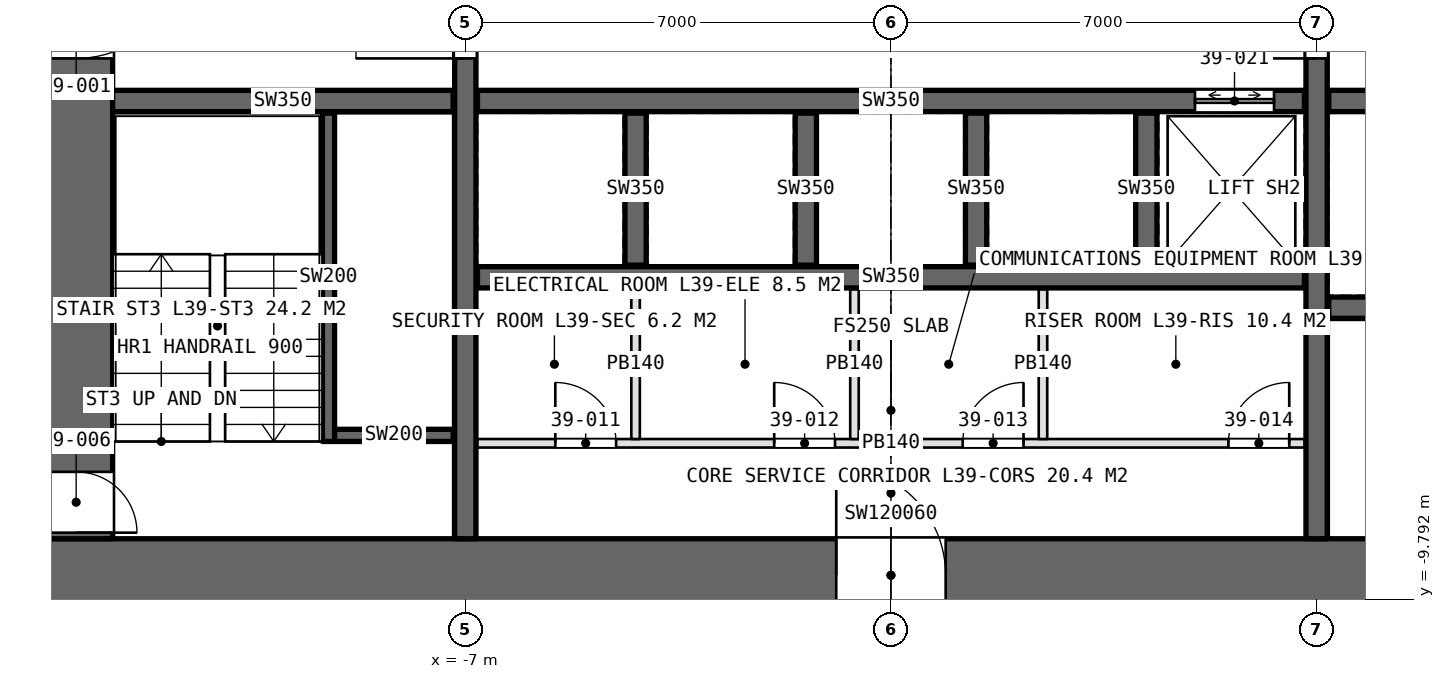
"""IFC4 building model, lengths in metres.
Left out: names, types, materials, properties, quantities, classifications, styles, units other than length and angle.
Written with IfcOpenShell. Run it as: python <this file> out.ifc"""

import sys

from ifc_helpers import new_model, si_unit, direction, frame, frame_2d, origin, place, context, subcontext, project, spatial, rectangle, extrude, element, fill, save


model = new_model("IFC4")
c1 = context("Model", 3, precision=1e-05, world=origin(), true_north=direction((0.0, 1.0)))
c2 = subcontext(c1, "Body", "Model", "MODEL_VIEW")
j1 = project(units=[si_unit("LENGTHUNIT", "METRE"), si_unit("PLANEANGLEUNIT", "RADIAN")], contexts=[c1])
p1 = place(None, origin())
s1 = spatial("IfcSite", under=j1, at=p1, CompositionType="ELEMENT")
p2 = place(p1, origin())
s2 = spatial("IfcBuilding", under=s1, at=p2, CompositionType="ELEMENT")
p3 = place(p2, frame((0.0, 0.0, 180.6)))
s3 = spatial("IfcBuildingStorey", under=s2, at=p3, CompositionType="ELEMENT", Elevation=180.6)
p4 = place(p3, frame((-14.0, -9.4, 0.0), z_axis=(0.0, 0.0, 1.0), x_axis=(1.0, 0.0, 0.0)))
e1 = element("IfcWall", 1, at=p4, inside=s3, PredefinedType="SHEAR", context=c2, shape_type="SweptSolid", body=[
    extrude(rectangle(XDim=28.0, YDim=1.2, at=frame_2d((14.0, 0.0))), origin(), (0.0, 0.0, 1.0), 4.2),
])
p5 = place(p4, frame((13.1, 0.0, 0.0)))
e2 = element("IfcOpeningElement", 2, at=p5, cuts=e1, PredefinedType="OPENING", context=c2, shape_type="SweptSolid", body=[
    extrude(rectangle(XDim=1.8, YDim=2.4, at=frame_2d((0.9, 1.2))), frame((0.0, 0.61, 0.0), z_axis=(0.0, -1.0, 0.0), x_axis=(1.0, 0.0, 0.0)), (0.0, 0.0, 1.0), 1.22),
])
p6 = place(p4, frame((22.9, 0.0, 0.0)))
e3 = element("IfcOpeningElement", 3, at=p6, cuts=e1, PredefinedType="OPENING", context=c2, shape_type="SweptSolid", body=[
    extrude(rectangle(XDim=2.2, YDim=2.7, at=frame_2d((1.1, 1.35))), frame((0.0, 0.61, 0.0), z_axis=(0.0, -1.0, 0.0), x_axis=(1.0, 0.0, 0.0)), (0.0, 0.0, 1.0), 1.22),
])
p7 = place(p3, frame((-13.4, 8.8, 0.0), z_axis=(0.0, 0.0, 1.0), x_axis=(0.0, -1.0, 0.0)))
e4 = element("IfcWall", 4, at=p7, inside=s3, PredefinedType="SHEAR", context=c2, shape_type="SweptSolid", body=[
    extrude(rectangle(XDim=17.6, YDim=1.2, at=frame_2d((8.8, 0.0))), origin(), (0.0, 0.0, 1.0), 4.2),
])
p8 = place(p7, frame((7.9, 0.0, 0.0)))
e5 = element("IfcOpeningElement", 5, at=p8, cuts=e4, PredefinedType="OPENING", context=c2, shape_type="SweptSolid", body=[
    extrude(rectangle(XDim=1.8, YDim=2.4, at=frame_2d((0.9, 1.2))), frame((0.0, 0.61, 0.0), z_axis=(0.0, -1.0, 0.0), x_axis=(1.0, 0.0, 0.0)), (0.0, 0.0, 1.0), 1.22),
])
p9 = place(p7, frame((16.5, 0.0, 0.0)))
e6 = element("IfcOpeningElement", 6, at=p9, cuts=e4, PredefinedType="OPENING", context=c2, shape_type="SweptSolid", body=[
    extrude(rectangle(XDim=1.0, YDim=2.4, at=frame_2d((0.5, 1.2))), frame((0.0, 0.61, 0.0), z_axis=(0.0, -1.0, 0.0), x_axis=(1.0, 0.0, 0.0)), (0.0, 0.0, 1.0), 1.22),
])
p10 = place(p3, frame((-7.0, -8.8, 0.0), z_axis=(0.0, 0.0, 1.0), x_axis=(0.0, 1.0, 0.0)))
e7 = element("IfcWall", 7, at=p10, inside=s3, PredefinedType="SHEAR", context=c2, shape_type="SweptSolid", body=[
    extrude(rectangle(XDim=17.6, YDim=0.35, at=frame_2d((8.8, 0.0))), origin(), (0.0, 0.0, 1.0), 4.2),
])
p11 = place(p10, frame((7.9, 0.0, 0.0)))
e8 = element("IfcOpeningElement", 8, at=p11, cuts=e7, PredefinedType="OPENING", context=c2, shape_type="SweptSolid", body=[
    extrude(rectangle(XDim=1.8, YDim=2.4, at=frame_2d((0.9, 1.2))), frame((0.0, 0.185, 0.0), z_axis=(0.0, -1.0, 0.0), x_axis=(1.0, 0.0, 0.0)), (0.0, 0.0, 1.0), 0.37),
])
p12 = place(p3, frame((7.0, -8.8, 0.0), z_axis=(0.0, 0.0, 1.0), x_axis=(0.0, 1.0, 0.0)))
e9 = element("IfcWall", 9, at=p12, inside=s3, PredefinedType="SHEAR", context=c2, shape_type="SweptSolid", body=[
    extrude(rectangle(XDim=17.6, YDim=0.35, at=frame_2d((8.8, 0.0))), origin(), (0.0, 0.0, 1.0), 4.2),
])
p13 = place(p12, frame((7.9, 0.0, 0.0)))
e10 = element("IfcOpeningElement", 10, at=p13, cuts=e9, PredefinedType="OPENING", context=c2, shape_type="SweptSolid", body=[
    extrude(rectangle(XDim=1.8, YDim=2.4, at=frame_2d((0.9, 1.2))), frame((0.0, 0.185, 0.0), z_axis=(0.0, -1.0, 0.0), x_axis=(1.0, 0.0, 0.0)), (0.0, 0.0, 1.0), 0.37),
])
p14 = place(p3, frame((-6.8, -1.6, 0.0), z_axis=(0.0, 0.0, 1.0), x_axis=(1.0, 0.0, 0.0)))
e11 = element("IfcWall", 11, at=p14, inside=s3, PredefinedType="SHEAR", context=c2, shape_type="SweptSolid", body=[
    extrude(rectangle(XDim=13.6, YDim=0.35, at=frame_2d((6.8, 0.0))), origin(), (0.0, 0.0, 1.0), 4.2),
])
p15 = place(p14, frame((11.8, 0.0, 0.0)))
e12 = element("IfcOpeningElement", 12, at=p15, cuts=e11, PredefinedType="OPENING", context=c2, shape_type="SweptSolid", body=[
    extrude(rectangle(XDim=1.3, YDim=2.4, at=frame_2d((0.65, 1.2))), frame((0.0, 0.185, 0.0), z_axis=(0.0, -1.0, 0.0), x_axis=(1.0, 0.0, 0.0)), (0.0, 0.0, 1.0), 0.37),
])
p16 = place(p3, frame((-6.8, -4.5, 0.0), z_axis=(0.0, 0.0, 1.0), x_axis=(1.0, 0.0, 0.0)))
e13 = element("IfcWall", 13, at=p16, inside=s3, PredefinedType="SHEAR", context=c2, shape_type="SweptSolid", body=[
    extrude(rectangle(XDim=13.6, YDim=0.35, at=frame_2d((6.8, 0.0))), origin(), (0.0, 0.0, 1.0), 4.2),
])
p17 = place(p3, frame((-12.8, -1.6, 0.0), z_axis=(0.0, 0.0, 1.0), x_axis=(1.0, 0.0, 0.0)))
e14 = element("IfcWall", 14, at=p17, inside=s3, PredefinedType="SHEAR", context=c2, shape_type="SweptSolid", body=[
    extrude(rectangle(XDim=5.6, YDim=0.35, at=frame_2d((2.8, 0.0))), origin(), (0.0, 0.0, 1.0), 4.2),
])
p18 = place(p3, frame((7.2, -1.6, 0.0), z_axis=(0.0, 0.0, 1.0), x_axis=(1.0, 0.0, 0.0)))
e15 = element("IfcWall", 15, at=p18, inside=s3, PredefinedType="SHEAR", context=c2, shape_type="SweptSolid", body=[
    extrude(rectangle(XDim=5.6, YDim=0.35, at=frame_2d((2.8, 0.0))), origin(), (0.0, 0.0, 1.0), 4.2),
])
p19 = place(p18, frame((0.9, 0.0, 0.0)))
e16 = element("IfcOpeningElement", 16, at=p19, cuts=e15, PredefinedType="OPENING", context=c2, shape_type="SweptSolid", body=[
    extrude(rectangle(XDim=1.3, YDim=2.4, at=frame_2d((0.65, 1.2))), frame((0.0, 0.185, 0.0), z_axis=(0.0, -1.0, 0.0), x_axis=(1.0, 0.0, 0.0)), (0.0, 0.0, 1.0), 0.37),
])
p20 = place(p18, frame((3.9, 0.0, 0.0)))
e17 = element("IfcOpeningElement", 17, at=p20, cuts=e15, PredefinedType="OPENING", context=c2, shape_type="SweptSolid", body=[
    extrude(rectangle(XDim=1.3, YDim=2.4, at=frame_2d((0.65, 1.2))), frame((0.0, 0.185, 0.0), z_axis=(0.0, -1.0, 0.0), x_axis=(1.0, 0.0, 0.0)), (0.0, 0.0, 1.0), 0.37),
])
p21 = place(p3, frame((7.2, -5.0, 0.0), z_axis=(0.0, 0.0, 1.0), x_axis=(1.0, 0.0, 0.0)))
e18 = element("IfcWall", 18, at=p21, inside=s3, PredefinedType="SHEAR", context=c2, shape_type="SweptSolid", body=[
    extrude(rectangle(XDim=5.6, YDim=0.35, at=frame_2d((2.8, 0.0))), origin(), (0.0, 0.0, 1.0), 4.2),
])
for number, where, z_axis, x_axis in (
    (19, (-4.2, -4.3, 0.0), (0.0, 0.0, 1.0), (0.0, 1.0, 0.0)),
    (20, (-1.4, -4.3, 0.0), (0.0, 0.0, 1.0), (0.0, 1.0, 0.0)),
    (21, (1.4, -4.3, 0.0), (0.0, 0.0, 1.0), (0.0, 1.0, 0.0)),
    (22, (4.2, -4.3, 0.0), (0.0, 0.0, 1.0), (0.0, 1.0, 0.0)),
):
    element("IfcWall", number, at=place(p3, frame(where, z_axis=z_axis, x_axis=x_axis)), inside=s3, PredefinedType="SHEAR", context=c2, shape_type="SweptSolid", body=[
        extrude(rectangle(XDim=2.5, YDim=0.35, at=frame_2d((1.25, 0.0))), origin(), (0.0, 0.0, 1.0), 4.2),
    ])
p22 = place(p3, frame((-6.8, -7.23, 0.0), z_axis=(0.0, 0.0, 1.0), x_axis=(1.0, 0.0, 0.0)))
e23 = element("IfcWall", 23, at=p22, inside=s3, PredefinedType="PARTITIONING", context=c2, shape_type="SweptSolid", body=[
    extrude(rectangle(XDim=13.6, YDim=0.14, at=frame_2d((6.8, 0.0))), origin(), (0.0, 0.0, 1.0), 3.95),
])
p23 = place(p22, frame((1.28, 0.0, 0.0)))
e24 = element("IfcOpeningElement", 24, at=p23, cuts=e23, PredefinedType="OPENING", context=c2, shape_type="SweptSolid", body=[
    extrude(rectangle(XDim=1.0, YDim=2.4, at=frame_2d((0.5, 1.2))), frame((0.0, 0.08, 0.0), z_axis=(0.0, -1.0, 0.0), x_axis=(1.0, 0.0, 0.0)), (0.0, 0.0, 1.0), 0.16),
])
p24 = place(p22, frame((4.88, 0.0, 0.0)))
e25 = element("IfcOpeningElement", 25, at=p24, cuts=e23, PredefinedType="OPENING", context=c2, shape_type="SweptSolid", body=[
    extrude(rectangle(XDim=1.0, YDim=2.4, at=frame_2d((0.5, 1.2))), frame((0.0, 0.08, 0.0), z_axis=(0.0, -1.0, 0.0), x_axis=(1.0, 0.0, 0.0)), (0.0, 0.0, 1.0), 0.16),
])
p25 = place(p22, frame((7.98, 0.0, 0.0)))
e26 = element("IfcOpeningElement", 26, at=p25, cuts=e23, PredefinedType="OPENING", context=c2, shape_type="SweptSolid", body=[
    extrude(rectangle(XDim=1.0, YDim=2.4, at=frame_2d((0.5, 1.2))), frame((0.0, 0.08, 0.0), z_axis=(0.0, -1.0, 0.0), x_axis=(1.0, 0.0, 0.0)), (0.0, 0.0, 1.0), 0.16),
])
p26 = place(p22, frame((12.35, 0.0, 0.0)))
e27 = element("IfcOpeningElement", 27, at=p26, cuts=e23, PredefinedType="OPENING", context=c2, shape_type="SweptSolid", body=[
    extrude(rectangle(XDim=1.0, YDim=2.4, at=frame_2d((0.5, 1.2))), frame((0.0, 0.08, 0.0), z_axis=(0.0, -1.0, 0.0), x_axis=(1.0, 0.0, 0.0)), (0.0, 0.0, 1.0), 0.16),
])
for number, where, z_axis, x_axis in (
    (28, (-4.2, -4.7, 0.0), (0.0, 0.0, 1.0), (0.0, -1.0, 0.0)),
    (29, (-0.6, -4.7, 0.0), (0.0, 0.0, 1.0), (0.0, -1.0, 0.0)),
    (30, (2.5, -4.7, 0.0), (0.0, 0.0, 1.0), (0.0, -1.0, 0.0)),
):
    element("IfcWall", number, at=place(p3, frame(where, z_axis=z_axis, x_axis=x_axis)), inside=s3, PredefinedType="PARTITIONING", context=c2, shape_type="SweptSolid", body=[
        extrude(rectangle(XDim=2.46, YDim=0.14, at=frame_2d((1.23, 0.0))), origin(), (0.0, 0.0, 1.0), 3.95),
    ])
p27 = place(p3, frame((-9.25, -7.2, 0.0), z_axis=(0.0, 0.0, 1.0), x_axis=(0.0, 1.0, 0.0)))
e31 = element("IfcWall", 31, at=p27, inside=s3, PredefinedType="SOLIDWALL", context=c2, shape_type="SweptSolid", body=[
    extrude(rectangle(XDim=5.4, YDim=0.2, at=frame_2d((2.7, 0.0))), origin(), (0.0, 0.0, 1.0), 4.2),
])
p28 = place(p3, frame((-9.15, -7.1, 0.0), z_axis=(0.0, 0.0, 1.0), x_axis=(1.0, 0.0, 0.0)))
e32 = element("IfcWall", 32, at=p28, inside=s3, PredefinedType="SOLIDWALL", context=c2, shape_type="SweptSolid", body=[
    extrude(rectangle(XDim=1.95, YDim=0.2, at=frame_2d((0.975, 0.0))), origin(), (0.0, 0.0, 1.0), 4.2),
])
p29 = place(p8, origin())
e33 = element("IfcDoor", 33, at=p29, inside=s3, OperationType="DOUBLE_DOOR_SINGLE_SWING", PredefinedType="DOOR", context=c2, shape_type="SweptSolid", body=[
    extrude(rectangle(XDim=1.8, YDim=2.4, at=frame_2d((0.9, 1.2))), frame((0.0, 0.025, 0.0), z_axis=(0.0, -1.0, 0.0), x_axis=(1.0, 0.0, 0.0)), (0.0, 0.0, 1.0), 0.05),
])
fill(e5, e33)
p30 = place(p11, origin())
e34 = element("IfcDoor", 34, at=p30, inside=s3, OperationType="DOUBLE_DOOR_SINGLE_SWING", PredefinedType="DOOR", context=c2, shape_type="SweptSolid", body=[
    extrude(rectangle(XDim=1.8, YDim=2.4, at=frame_2d((0.9, 1.2))), frame((0.0, 0.025, 0.0), z_axis=(0.0, -1.0, 0.0), x_axis=(1.0, 0.0, 0.0)), (0.0, 0.0, 1.0), 0.05),
])
fill(e8, e34)
p31 = place(p13, origin())
e35 = element("IfcDoor", 35, at=p31, inside=s3, OperationType="DOUBLE_DOOR_SINGLE_SWING", PredefinedType="DOOR", context=c2, shape_type="SweptSolid", body=[
    extrude(rectangle(XDim=1.8, YDim=2.4, at=frame_2d((0.9, 1.2))), frame((0.0, 0.025, 0.0), z_axis=(0.0, -1.0, 0.0), x_axis=(1.0, 0.0, 0.0)), (0.0, 0.0, 1.0), 0.05),
])
fill(e10, e35)
p32 = place(p9, origin())
e36 = element("IfcDoor", 36, at=p32, inside=s3, OperationType="SINGLE_SWING_RIGHT", PredefinedType="DOOR", context=c2, shape_type="SweptSolid", body=[
    extrude(rectangle(XDim=1.0, YDim=2.4, at=frame_2d((0.5, 1.2))), frame((0.0, 0.025, 0.0), z_axis=(0.0, -1.0, 0.0), x_axis=(1.0, 0.0, 0.0)), (0.0, 0.0, 1.0), 0.05),
])
fill(e6, e36)
p33 = place(p23, origin())
e37 = element("IfcDoor", 37, at=p33, inside=s3, OperationType="SINGLE_SWING_LEFT", PredefinedType="DOOR", context=c2, shape_type="SweptSolid", body=[
    extrude(rectangle(XDim=1.0, YDim=2.4, at=frame_2d((0.5, 1.2))), frame((0.0, 0.025, 0.0), z_axis=(0.0, -1.0, 0.0), x_axis=(1.0, 0.0, 0.0)), (0.0, 0.0, 1.0), 0.05),
])
fill(e24, e37)
p34 = place(p24, origin())
e38 = element("IfcDoor", 38, at=p34, inside=s3, OperationType="SINGLE_SWING_LEFT", PredefinedType="DOOR", context=c2, shape_type="SweptSolid", body=[
    extrude(rectangle(XDim=1.0, YDim=2.4, at=frame_2d((0.5, 1.2))), frame((0.0, 0.025, 0.0), z_axis=(0.0, -1.0, 0.0), x_axis=(1.0, 0.0, 0.0)), (0.0, 0.0, 1.0), 0.05),
])
fill(e25, e38)
p35 = place(p25, origin())
e39 = element("IfcDoor", 39, at=p35, inside=s3, OperationType="SINGLE_SWING_RIGHT", PredefinedType="DOOR", context=c2, shape_type="SweptSolid", body=[
    extrude(rectangle(XDim=1.0, YDim=2.4, at=frame_2d((0.5, 1.2))), frame((0.0, 0.025, 0.0), z_axis=(0.0, -1.0, 0.0), x_axis=(1.0, 0.0, 0.0)), (0.0, 0.0, 1.0), 0.05),
])
fill(e26, e39)
p36 = place(p26, origin())
e40 = element("IfcDoor", 40, at=p36, inside=s3, OperationType="SINGLE_SWING_RIGHT", PredefinedType="DOOR", context=c2, shape_type="SweptSolid", body=[
    extrude(rectangle(XDim=1.0, YDim=2.4, at=frame_2d((0.5, 1.2))), frame((0.0, 0.025, 0.0), z_axis=(0.0, -1.0, 0.0), x_axis=(1.0, 0.0, 0.0)), (0.0, 0.0, 1.0), 0.05),
])
fill(e27, e40)
p37 = place(p5, origin())
e41 = element("IfcDoor", 41, at=p37, inside=s3, OperationType="DOUBLE_DOOR_SINGLE_SWING", PredefinedType="DOOR", context=c2, shape_type="SweptSolid", body=[
    extrude(rectangle(XDim=1.8, YDim=2.4, at=frame_2d((0.9, 1.2))), frame((0.0, 0.025, 0.0), z_axis=(0.0, -1.0, 0.0), x_axis=(1.0, 0.0, 0.0)), (0.0, 0.0, 1.0), 0.05),
])
fill(e2, e41)
p38 = place(p15, origin())
e42 = element("IfcDoor", 42, at=p38, inside=s3, OperationType="DOUBLE_DOOR_SLIDING", PredefinedType="DOOR", context=c2, shape_type="SweptSolid", body=[
    extrude(rectangle(XDim=1.3, YDim=2.4, at=frame_2d((0.65, 1.2))), frame((0.0, 0.025, 0.0), z_axis=(0.0, -1.0, 0.0), x_axis=(1.0, 0.0, 0.0)), (0.0, 0.0, 1.0), 0.05),
])
fill(e12, e42)
save(model, sys.argv[1])
